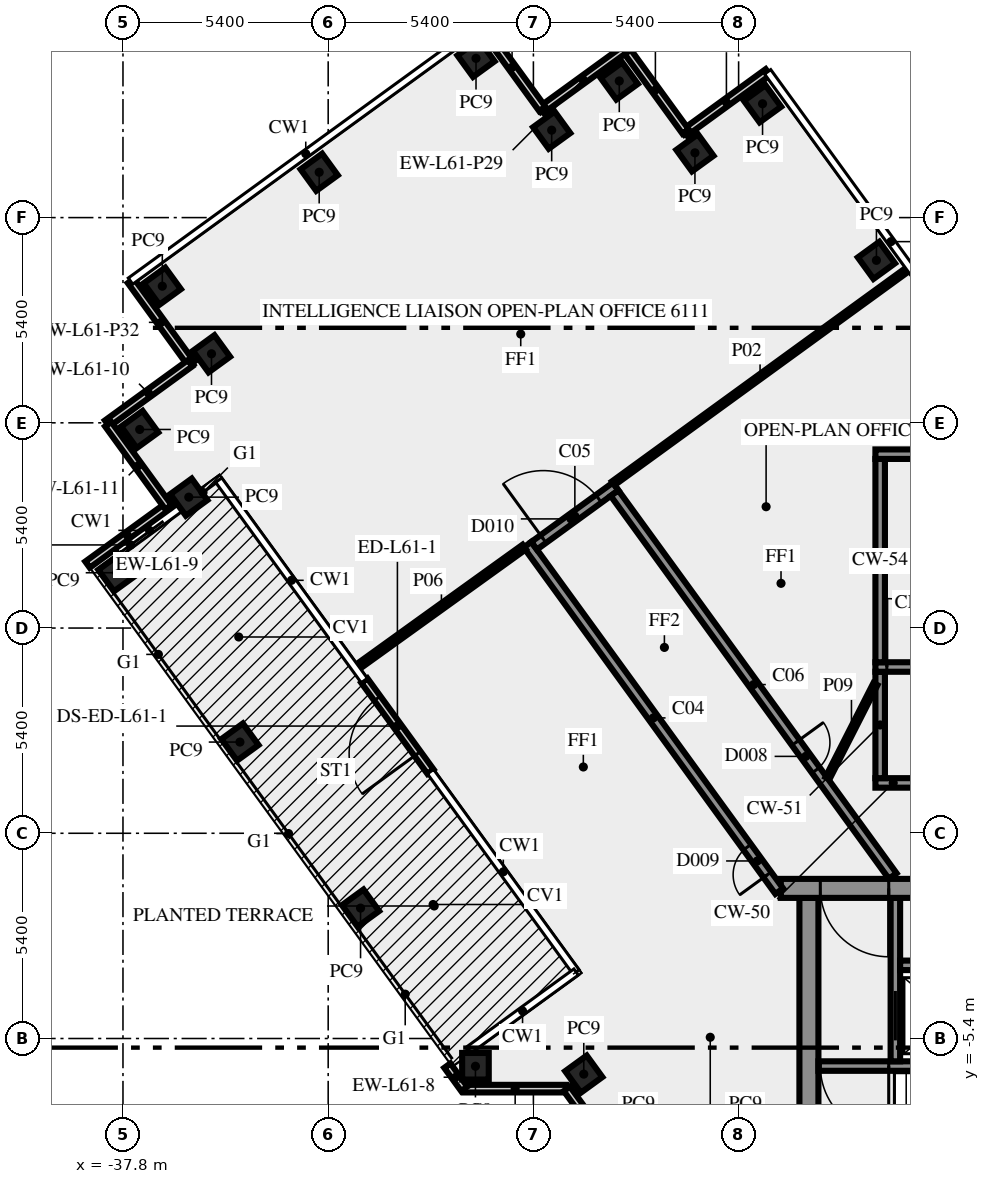
"""IFC4 building model, lengths in metres.
Left out: names, types, materials, properties, quantities, classifications, styles, units other than length and angle.
Written with IfcOpenShell. Run it as: python <this file> out.ifc"""

import sys

from ifc_helpers import new_model, si_unit, direction, frame, frame_2d, origin, origin_2d, place, context, subcontext, project, spatial, rectangle, extrude, element, fill, save


model = new_model("IFC4")
c1 = context("Model", 3, precision=1e-05, world=origin(), true_north=direction((0.0, 1.0)))
c2 = subcontext(c1, "Body", "Model", "MODEL_VIEW")
j1 = project(units=[si_unit("LENGTHUNIT", "METRE"), si_unit("PLANEANGLEUNIT", "RADIAN")], contexts=[c1])
p1 = place(None, origin())
s1 = spatial("IfcSite", under=j1, at=p1, CompositionType="ELEMENT")
p2 = place(p1, origin())
s2 = spatial("IfcBuilding", under=s1, at=p2, CompositionType="ELEMENT")
p3 = place(p2, frame((0.0, 0.0, 261.0)))
s3 = spatial("IfcBuildingStorey", under=s2, at=p3, CompositionType="ELEMENT", Elevation=261.0)
for number, where, z_axis, x_axis in (
    (1, (-17.974, 15.075, 0.0), (0.0, 0.0, 1.0), (-0.588, 0.809, 0.0)),
    (2, (-20.97, 19.195, 0.0), (0.0, 0.0, 1.0), (-0.588, 0.809, 0.0)),
    (3, (-22.749, 17.904, 0.0), (0.0, 0.0, 1.0), (-0.588, 0.809, 0.0)),
    (4, (-24.74, 19.795, 0.0), (0.0, 0.0, 1.0), (-0.588, 0.809, 0.0)),
    (5, (-26.519, 18.5, 0.0), (0.0, 0.0, 1.0), (-0.588, 0.809, 0.0)),
    (6, (-28.51, 20.39, 0.0), (0.0, 0.0, 1.0), (-0.809, -0.588, 0.0)),
    (7, (-32.637, 17.393, 0.0), (0.0, 0.0, 1.0), (-0.809, -0.588, 0.0)),
    (8, (-36.765, 14.395, 0.0), (0.0, 0.0, 1.0), (0.588, -0.809, 0.0)),
    (9, (-35.471, 12.616, 0.0), (0.0, 0.0, 1.0), (-0.809, -0.588, 0.0)),
    (10, (-37.36, 10.625, 0.0), (0.0, 0.0, 1.0), (0.588, -0.809, 0.0)),
    (11, (-36.068, 8.844, 0.0), (0.0, 0.0, 1.0), (0.588, -0.809, 0.0)),
    (12, (-37.96, 6.855, 0.0), (0.0, 0.0, 1.0), (0.588, -0.809, 0.0)),
    (13, (-34.722, 2.4, 0.0), (0.0, 0.0, 1.0), (0.588, -0.809, 0.0)),
    (14, (-31.548, -1.969, 0.0), (0.0, 0.0, 1.0), (0.588, -0.809, 0.0)),
    (15, (-28.525, -6.13, 0.0), (0.0, 0.0, 1.0), (1.0, 0.0, 0.0)),
    (16, (-25.674, -6.337, 0.0), (0.0, 0.0, 1.0), (0.588, -0.809, 0.0)),
):
    element("IfcColumn", number, at=place(p3, frame(where, z_axis=z_axis, x_axis=x_axis)), inside=s3, PredefinedType="COLUMN", context=c2, shape_type="SweptSolid", body=[
        extrude(rectangle(XDim=0.7, YDim=0.7, at=origin_2d()), origin(), (0.0, 0.0, 1.0), 3.65),
    ])
for number, where, z_axis, x_axis in (
    (17, (-20.829, 20.025, 0.0), (0.0, 0.0, 1.0), (-0.809, -0.588, 0.0)),
    (18, (-22.996, 18.466, 0.0), (0.0, 0.0, 1.0), (-0.588, 0.809, 0.0)),
):
    element("IfcWall", number, at=place(p3, frame(where, z_axis=z_axis, x_axis=x_axis)), inside=s3, PredefinedType="SOLIDWALL", context=c2, shape_type="SweptSolid", body=[
        extrude(rectangle(XDim=2.7, YDim=0.2, at=frame_2d((1.35, 0.0))), origin(), (0.0, 0.0, 1.0), 3.65),
    ])
for number, where, z_axis, x_axis in (
    (19, (-24.6, 20.623, 0.0), (0.0, 0.0, 1.0), (-0.809, -0.588, 0.0)),
    (20, (-26.768, 19.063, 0.0), (0.0, 0.0, 1.0), (-0.588, 0.809, 0.0)),
):
    element("IfcWall", number, at=place(p3, frame(where, z_axis=z_axis, x_axis=x_axis)), inside=s3, PredefinedType="SOLIDWALL", context=c2, shape_type="SweptSolid", body=[
        extrude(rectangle(XDim=2.7, YDim=0.2, at=frame_2d((1.35, 0.0))), origin(), (0.0, 0.0, 1.0), 3.65),
    ])
for number, where, z_axis, x_axis in (
    (21, (-37.592, 14.536, 0.0), (0.0, 0.0, 1.0), (0.588, -0.809, 0.0)),
    (22, (-28.83, -6.719, 0.0), (0.0, 0.0, 1.0), (1.0, 0.0, 0.0)),
):
    element("IfcWall", number, at=place(p3, frame(where, z_axis=z_axis, x_axis=x_axis)), inside=s3, PredefinedType="SOLIDWALL", context=c2, shape_type="SweptSolid", body=[
        extrude(rectangle(XDim=2.7, YDim=0.2, at=frame_2d((1.35, 0.0))), origin(), (0.0, 0.0, 1.0), 3.65),
    ])
p4 = place(p3, frame((-26.12, -6.724, 0.0), z_axis=(0.0, 0.0, 1.0), x_axis=(0.587720002413, -0.809064397168, 0.0)))
e23 = element("IfcWall", 23, at=p4, inside=s3, PredefinedType="SOLIDWALL", context=c2, shape_type="SweptSolid", body=[
    extrude(rectangle(XDim=2.7, YDim=0.2, at=frame_2d((1.35, 0.0))), origin(), (0.0, 0.0, 1.0), 3.65),
])
p5 = place(p3, frame((-29.708, 1.622, 0.0), z_axis=(0.0, 0.0, 1.0), x_axis=(-0.58782869016, 0.808985433135, 0.0)))
e24 = element("IfcWall", 24, at=p5, inside=s3, PredefinedType="SOLIDWALL", context=c2, shape_type="SweptSolid", body=[
    extrude(rectangle(XDim=2.963, YDim=0.2, at=frame_2d((1.481, 0.0))), origin(), (0.0, 0.0, 1.0), 3.65),
])
p6 = place(p5, frame((0.582, 0.0, 0.0)))
e25 = element("IfcOpeningElement", 25, at=p6, cuts=e24, PredefinedType="OPENING", context=c2, shape_type="SweptSolid", body=[
    extrude(rectangle(XDim=1.8, YDim=2.4, at=frame_2d((0.9, 1.2))), frame((0.0, 0.11, 0.0), z_axis=(0.0, -1.0, 0.0), x_axis=(1.0, 0.0, 0.0)), (0.0, 0.0, 1.0), 0.22),
])
p7 = place(p3, frame((-29.264, -6.113, 0.0), z_axis=(0.0, 0.0, 1.0), x_axis=(0.587941177097, -0.808903685412, 0.0)))
e26 = element("IfcWall", 26, at=p7, inside=s3, PredefinedType="SOLIDWALL", context=c2, shape_type="SweptSolid", body=[
    extrude(rectangle(XDim=0.756, YDim=0.2, at=frame_2d((0.378, 0.0))), origin(), (0.0, 0.0, 1.0), 3.65),
])
p8 = place(p3, frame((-36.629, 8.597, 0.0), z_axis=(0.0, 0.0, 1.0), x_axis=(-0.80901210161, -0.587791986546, 0.0)))
e27 = element("IfcWall", 27, at=p8, inside=s3, PredefinedType="SOLIDWALL", context=c2, shape_type="SweptSolid", body=[
    extrude(rectangle(XDim=2.6, YDim=0.2, at=frame_2d((1.3, 0.0))), origin(), (0.0, 0.0, 1.0), 3.65),
])
for number, where, z_axis, x_axis in (
    (28, (-36.032, 12.369, 0.0), (0.0, 0.0, 1.0), (-0.809, -0.588, 0.0)),
    (29, (-38.189, 10.765, 0.0), (0.0, 0.0, 1.0), (0.588, -0.809, 0.0)),
):
    element("IfcWall", number, at=place(p3, frame(where, z_axis=z_axis, x_axis=x_axis)), inside=s3, PredefinedType="SOLIDWALL", context=c2, shape_type="SweptSolid", body=[
        extrude(rectangle(XDim=2.7, YDim=0.2, at=frame_2d((1.35, 0.0))), origin(), (0.0, 0.0, 1.0), 3.65),
    ])
p9 = place(p3, frame((-19.75, -10.5, 0.0), z_axis=(0.0, 0.0, 1.0), x_axis=(0.0, 1.0, 0.0)))
e30 = element("IfcWall", 30, at=p9, inside=s3, PredefinedType="SHEAR", context=c2, shape_type="SweptSolid", body=[
    extrude(rectangle(XDim=8.8, YDim=0.5, at=frame_2d((4.4, 0.0))), origin(), (0.0, 0.0, 1.0), 3.65),
])
p10 = place(p3, frame((-11.45, -6.125, 0.0), z_axis=(0.0, 0.0, 1.0), x_axis=(-1.0, 0.0, 0.0)))
e31 = element("IfcWall", 31, at=p10, inside=s3, PredefinedType="SHEAR", context=c2, shape_type="SweptSolid", body=[
    extrude(rectangle(XDim=8.05, YDim=0.25, at=frame_2d((4.025, 0.0))), origin(), (0.0, 0.0, 1.0), 3.65),
])
p11 = place(p10, frame((6.2, 0.0, 0.0)))
e32 = element("IfcOpeningElement", 32, at=p11, cuts=e31, PredefinedType="OPENING", context=c2, shape_type="SweptSolid", body=[
    extrude(rectangle(XDim=1.8, YDim=2.1, at=frame_2d((0.9, 1.05))), frame((0.0, 0.135, 0.0), z_axis=(0.0, -1.0, 0.0), x_axis=(1.0, 0.0, 0.0)), (0.0, 0.0, 1.0), 0.27),
])
p12 = place(p3, frame((-17.475, -6.0, 0.0), z_axis=(0.0, 0.0, 1.0), x_axis=(0.0, 1.0, 0.0)))
e33 = element("IfcWall", 33, at=p12, inside=s3, PredefinedType="SHEAR", context=c2, shape_type="SweptSolid", body=[
    extrude(rectangle(XDim=4.3, YDim=0.25, at=frame_2d((2.15, 0.0))), origin(), (0.0, 0.0, 1.0), 3.65),
])
p13 = place(p12, frame((0.55, 0.0, 0.0)))
e34 = element("IfcOpeningElement", 34, at=p13, cuts=e33, PredefinedType="OPENING", context=c2, shape_type="SweptSolid", body=[
    extrude(rectangle(XDim=1.3, YDim=2.1, at=frame_2d((0.65, 1.05))), frame((0.0, 0.135, 0.0), z_axis=(0.0, -1.0, 0.0), x_axis=(1.0, 0.0, 0.0)), (0.0, 0.0, 1.0), 0.27),
])
p14 = place(p3, frame((-17.35, -3.475, 0.0), z_axis=(0.0, 0.0, 1.0), x_axis=(1.0, 0.0, 0.0)))
e35 = element("IfcWall", 35, at=p14, inside=s3, PredefinedType="SHEAR", context=c2, shape_type="SweptSolid", body=[
    extrude(rectangle(XDim=3.25, YDim=0.25, at=frame_2d((1.625, 0.0))), origin(), (0.0, 0.0, 1.0), 3.65),
])
p15 = place(p3, frame((20.49, -1.45, 0.0), z_axis=(0.0, 0.0, 1.0), x_axis=(-1.0, 0.0, 0.0)))
e36 = element("IfcWall", 36, at=p15, inside=s3, PredefinedType="SHEAR", context=c2, shape_type="SweptSolid", body=[
    extrude(rectangle(XDim=40.98, YDim=0.5, at=frame_2d((20.49, 0.0))), origin(), (0.0, 0.0, 1.0), 3.65),
])
p16 = place(p15, frame((38.14, 0.0, 0.0)))
e37 = element("IfcOpeningElement", 37, at=p16, cuts=e36, PredefinedType="OPENING", context=c2, shape_type="SweptSolid", body=[
    extrude(rectangle(XDim=1.8, YDim=2.1, at=frame_2d((0.9, 1.05))), frame((0.0, 0.26, 0.0), z_axis=(0.0, -1.0, 0.0), x_axis=(1.0, 0.0, 0.0)), (0.0, 0.0, 1.0), 0.52),
])
p17 = place(p15, frame((35.89, 0.0, 0.0)))
e38 = element("IfcOpeningElement", 38, at=p17, cuts=e36, PredefinedType="OPENING", context=c2, shape_type="SweptSolid", body=[
    extrude(rectangle(XDim=0.9, YDim=2.1, at=frame_2d((0.45, 1.05))), frame((0.0, 0.26, 0.0), z_axis=(0.0, -1.0, 0.0), x_axis=(1.0, 0.0, 0.0)), (0.0, 0.0, 1.0), 0.52),
])
p18 = place(p15, frame((32.94, 0.0, 0.0)))
e39 = element("IfcOpeningElement", 39, at=p18, cuts=e36, PredefinedType="OPENING", context=c2, shape_type="SweptSolid", body=[
    extrude(rectangle(XDim=0.9, YDim=2.1, at=frame_2d((0.45, 1.05))), frame((0.0, 0.26, 0.0), z_axis=(0.0, -1.0, 0.0), x_axis=(1.0, 0.0, 0.0)), (0.0, 0.0, 1.0), 0.52),
])
p19 = place(p15, frame((31.015, 0.0, 0.0)))
e40 = element("IfcOpeningElement", 40, at=p19, cuts=e36, PredefinedType="OPENING", context=c2, shape_type="SweptSolid", body=[
    extrude(rectangle(XDim=0.8, YDim=2.1, at=frame_2d((0.4, 1.05))), frame((0.0, 0.26, 0.0), z_axis=(0.0, -1.0, 0.0), x_axis=(1.0, 0.0, 0.0)), (0.0, 0.0, 1.0), 0.52),
])
p20 = place(p15, frame((24.765, 0.0, 0.0)))
e41 = element("IfcOpeningElement", 41, at=p20, cuts=e36, PredefinedType="OPENING", context=c2, shape_type="SweptSolid", body=[
    extrude(rectangle(XDim=0.8, YDim=2.1, at=frame_2d((0.4, 1.05))), frame((0.0, 0.26, 0.0), z_axis=(0.0, -1.0, 0.0), x_axis=(1.0, 0.0, 0.0)), (0.0, 0.0, 1.0), 0.52),
])
p21 = place(p15, frame((21.765, 0.0, 0.0)))
e42 = element("IfcOpeningElement", 42, at=p21, cuts=e36, PredefinedType="OPENING", context=c2, shape_type="SweptSolid", body=[
    extrude(rectangle(XDim=2.0, YDim=2.1, at=frame_2d((1.0, 1.05))), frame((0.0, 0.26, 0.0), z_axis=(0.0, -1.0, 0.0), x_axis=(1.0, 0.0, 0.0)), (0.0, 0.0, 1.0), 0.52),
])
p22 = place(p15, frame((14.202, 0.0, 0.0)))
e43 = element("IfcOpeningElement", 43, at=p22, cuts=e36, PredefinedType="OPENING", context=c2, shape_type="SweptSolid", body=[
    extrude(rectangle(XDim=0.9, YDim=2.1, at=frame_2d((0.45, 1.05))), frame((0.0, 0.26, 0.0), z_axis=(0.0, -1.0, 0.0), x_axis=(1.0, 0.0, 0.0)), (0.0, 0.0, 1.0), 0.52),
])
p23 = place(p15, frame((10.478, 0.0, 0.0)))
e44 = element("IfcOpeningElement", 44, at=p23, cuts=e36, PredefinedType="OPENING", context=c2, shape_type="SweptSolid", body=[
    extrude(rectangle(XDim=0.9, YDim=2.1, at=frame_2d((0.45, 1.05))), frame((0.0, 0.26, 0.0), z_axis=(0.0, -1.0, 0.0), x_axis=(1.0, 0.0, 0.0)), (0.0, 0.0, 1.0), 0.52),
])
p24 = place(p15, frame((7.14, 0.0, 0.0)))
e45 = element("IfcOpeningElement", 45, at=p24, cuts=e36, PredefinedType="OPENING", context=c2, shape_type="SweptSolid", body=[
    extrude(rectangle(XDim=0.9, YDim=2.1, at=frame_2d((0.45, 1.05))), frame((0.0, 0.26, 0.0), z_axis=(0.0, -1.0, 0.0), x_axis=(1.0, 0.0, 0.0)), (0.0, 0.0, 1.0), 0.52),
])
p25 = place(p15, frame((5.028, 0.0, 0.0)))
e46 = element("IfcOpeningElement", 46, at=p25, cuts=e36, PredefinedType="OPENING", context=c2, shape_type="SweptSolid", body=[
    extrude(rectangle(XDim=0.8, YDim=2.1, at=frame_2d((0.4, 1.05))), frame((0.0, 0.26, 0.0), z_axis=(0.0, -1.0, 0.0), x_axis=(1.0, 0.0, 0.0)), (0.0, 0.0, 1.0), 0.52),
])
p26 = place(p15, frame((3.452, 0.0, 0.0)))
e47 = element("IfcOpeningElement", 47, at=p26, cuts=e36, PredefinedType="OPENING", context=c2, shape_type="SweptSolid", body=[
    extrude(rectangle(XDim=0.8, YDim=2.1, at=frame_2d((0.4, 1.05))), frame((0.0, 0.26, 0.0), z_axis=(0.0, -1.0, 0.0), x_axis=(1.0, 0.0, 0.0)), (0.0, 0.0, 1.0), 0.52),
])
p27 = place(p15, frame((1.04, 0.0, 0.0)))
e48 = element("IfcOpeningElement", 48, at=p27, cuts=e36, PredefinedType="OPENING", context=c2, shape_type="SweptSolid", body=[
    extrude(rectangle(XDim=1.8, YDim=2.1, at=frame_2d((0.9, 1.05))), frame((0.0, 0.26, 0.0), z_axis=(0.0, -1.0, 0.0), x_axis=(1.0, 0.0, 0.0)), (0.0, 0.0, 1.0), 0.52),
])
p28 = place(p3, frame((-18.0, 1.325, 0.0), z_axis=(0.0, 0.0, 1.0), x_axis=(1.0, 0.0, 0.0)))
e49 = element("IfcWall", 49, at=p28, inside=s3, PredefinedType="SHEAR", context=c2, shape_type="SweptSolid", body=[
    extrude(rectangle(XDim=3.9, YDim=0.25, at=frame_2d((1.95, 0.0))), origin(), (0.0, 0.0, 1.0), 3.65),
])
p29 = place(p28, frame((1.1, 0.0, 0.0)))
e50 = element("IfcOpeningElement", 50, at=p29, cuts=e49, PredefinedType="OPENING", context=c2, shape_type="SweptSolid", body=[
    extrude(rectangle(XDim=1.8, YDim=2.1, at=frame_2d((0.9, 1.05))), frame((0.0, 0.135, 0.0), z_axis=(0.0, -1.0, 0.0), x_axis=(1.0, 0.0, 0.0)), (0.0, 0.0, 1.0), 0.27),
])
p30 = place(p3, frame((-17.875, 1.45, 0.0), z_axis=(0.0, 0.0, 1.0), x_axis=(0.0, 1.0, 0.0)))
e51 = element("IfcWall", 51, at=p30, inside=s3, PredefinedType="SHEAR", context=c2, shape_type="SweptSolid", body=[
    extrude(rectangle(XDim=2.8, YDim=0.25, at=frame_2d((1.4, 0.0))), origin(), (0.0, 0.0, 1.0), 3.65),
])
p31 = place(p3, frame((-18.0, 4.375, 0.0), z_axis=(0.0, 0.0, 1.0), x_axis=(1.0, 0.0, 0.0)))
e52 = element("IfcWall", 52, at=p31, inside=s3, PredefinedType="SHEAR", context=c2, shape_type="SweptSolid", body=[
    extrude(rectangle(XDim=10.5, YDim=0.25, at=frame_2d((5.25, 0.0))), origin(), (0.0, 0.0, 1.0), 3.65),
])
p32 = place(p31, frame((0.3, 0.0, 0.0)))
e53 = element("IfcOpeningElement", 53, at=p32, cuts=e52, PredefinedType="OPENING", context=c2, shape_type="SweptSolid", body=[
    extrude(rectangle(XDim=1.8, YDim=2.1, at=frame_2d((0.9, 1.05))), frame((0.0, 0.135, 0.0), z_axis=(0.0, -1.0, 0.0), x_axis=(1.0, 0.0, 0.0)), (0.0, 0.0, 1.0), 0.27),
])
p33 = place(p3, frame((-17.875, 4.5, 0.0), z_axis=(0.0, 0.0, 1.0), x_axis=(0.0, 1.0, 0.0)))
e54 = element("IfcWall", 54, at=p33, inside=s3, PredefinedType="SHEAR", context=c2, shape_type="SweptSolid", body=[
    extrude(rectangle(XDim=5.35, YDim=0.25, at=frame_2d((2.675, 0.0))), origin(), (0.0, 0.0, 1.0), 3.65),
])
p34 = place(p3, frame((-18.0, 9.975, 0.0), z_axis=(0.0, 0.0, 1.0), x_axis=(1.0, 0.0, 0.0)))
e55 = element("IfcWall", 55, at=p34, inside=s3, PredefinedType="SHEAR", context=c2, shape_type="SweptSolid", body=[
    extrude(rectangle(XDim=10.5, YDim=0.25, at=frame_2d((5.25, 0.0))), origin(), (0.0, 0.0, 1.0), 3.65),
])
p35 = place(p34, frame((4.5, 0.0, 1.0)))
e56 = element("IfcOpeningElement", 56, at=p35, cuts=e55, PredefinedType="OPENING", context=c2, shape_type="SweptSolid", body=[
    extrude(rectangle(XDim=1.2, YDim=1.2, at=frame_2d((0.6, 0.6))), frame((0.0, 0.135, 0.0), z_axis=(0.0, -1.0, 0.0), x_axis=(1.0, 0.0, 0.0)), (0.0, 0.0, 1.0), 0.27),
])
p36 = place(p3, frame((-20.531, -1.523, 0.0), z_axis=(0.0, 0.0, 1.0), x_axis=(-0.587782646447, 0.809018887626, 0.0)))
e57 = element("IfcWall", 57, at=p36, inside=s3, PredefinedType="SOLIDWALL", context=c2, shape_type="SweptSolid", body=[
    extrude(rectangle(XDim=11.27, YDim=0.25, at=frame_2d((5.635, 0.0))), origin(), (0.0, 0.0, 1.0), 3.65),
])
p37 = place(p36, frame((0.533, 0.0, 0.0)))
e58 = element("IfcOpeningElement", 58, at=p37, cuts=e57, PredefinedType="OPENING", context=c2, shape_type="SweptSolid", body=[
    extrude(rectangle(XDim=0.9, YDim=2.1, at=frame_2d((0.45, 1.05))), frame((0.0, 0.135, 0.0), z_axis=(0.0, -1.0, 0.0), x_axis=(1.0, 0.0, 0.0)), (0.0, 0.0, 1.0), 0.27),
])
p38 = place(p3, frame((-26.981, 7.567, 0.0), z_axis=(0.0, 0.0, 1.0), x_axis=(0.809038743598, 0.587755315891, 0.0)))
e59 = element("IfcWall", 59, at=p38, inside=s3, PredefinedType="SOLIDWALL", context=c2, shape_type="SweptSolid", body=[
    extrude(rectangle(XDim=2.65, YDim=0.25, at=frame_2d((1.325, 0.0))), origin(), (0.0, 0.0, 1.0), 3.65),
])
p39 = place(p38, frame((0.3, 0.0, 0.0)))
e60 = element("IfcOpeningElement", 60, at=p39, cuts=e59, PredefinedType="OPENING", context=c2, shape_type="SweptSolid", body=[
    extrude(rectangle(XDim=1.8, YDim=2.1, at=frame_2d((0.9, 1.05))), frame((0.0, 0.135, 0.0), z_axis=(0.0, -1.0, 0.0), x_axis=(1.0, 0.0, 0.0)), (0.0, 0.0, 1.0), 0.27),
])
p40 = place(p3, frame((-24.865, 8.95, 0.0), z_axis=(0.0, 0.0, 1.0), x_axis=(0.587791617212, -0.809012369952, 0.0)))
e61 = element("IfcWall", 61, at=p40, inside=s3, PredefinedType="SOLIDWALL", context=c2, shape_type="SweptSolid", body=[
    extrude(rectangle(XDim=12.453, YDim=0.25, at=frame_2d((6.227, 0.0))), origin(), (0.0, 0.0, 1.0), 3.65),
])
p41 = place(p40, frame((8.112, 0.0, 0.0)))
e62 = element("IfcOpeningElement", 62, at=p41, cuts=e61, PredefinedType="OPENING", context=c2, shape_type="SweptSolid", body=[
    extrude(rectangle(XDim=0.9, YDim=2.1, at=frame_2d((0.45, 1.05))), frame((0.0, 0.135, 0.0), z_axis=(0.0, -1.0, 0.0), x_axis=(1.0, 0.0, 0.0)), (0.0, 0.0, 1.0), 0.27),
])
p42 = place(p3, frame((-17.172, 14.823, 0.0), z_axis=(0.0, 0.0, 1.0), x_axis=(-0.809034479891, -0.587761184791, 0.0)))
e63 = element("IfcWall", 63, at=p42, inside=s3, PredefinedType="PARTITIONING", context=c2, shape_type="SweptSolid", body=[
    extrude(rectangle(XDim=9.55, YDim=0.12, at=frame_2d((4.775, 0.0))), origin(), (0.0, 0.0, 1.0), 2.95),
])
p43 = place(p3, frame((-31.6, 4.397, 0.0), z_axis=(0.0, 0.0, 1.0), x_axis=(0.811784350662, 0.583957334075, 0.0)))
e64 = element("IfcWall", 64, at=p43, inside=s3, PredefinedType="PARTITIONING", context=c2, shape_type="SweptSolid", body=[
    extrude(rectangle(XDim=5.37, YDim=0.15, at=frame_2d((2.685, 0.0))), origin(), (0.0, 0.0, 1.0), 3.65),
])
p44 = place(p3, frame((-19.261, 1.45, 0.0), z_axis=(0.0, 0.0, 1.0), x_axis=(0.453950796792, 0.891026752736, 0.0)))
e65 = element("IfcWall", 65, at=p44, inside=s3, PredefinedType="PARTITIONING", context=c2, shape_type="SweptSolid", body=[
    extrude(rectangle(XDim=2.778, YDim=0.12, at=frame_2d((1.389, 0.0))), origin(), (0.0, 0.0, 1.0), 3.65),
])
p45 = place(p6, origin())
e66 = element("IfcDoor", 66, at=p45, inside=s3, OperationType="DOUBLE_DOOR_SINGLE_SWING", PredefinedType="DOOR", context=c2, shape_type="SweptSolid", body=[
    extrude(rectangle(XDim=1.8, YDim=2.4, at=frame_2d((0.9, 1.2))), frame((0.0, 0.025, 0.0), z_axis=(0.0, -1.0, 0.0), x_axis=(1.0, 0.0, 0.0)), (0.0, 0.0, 1.0), 0.05),
])
fill(e25, e66)
p46 = place(p11, origin())
e67 = element("IfcDoor", 67, at=p46, inside=s3, OperationType="DOUBLE_DOOR_SINGLE_SWING", PredefinedType="DOOR", context=c2, shape_type="SweptSolid", body=[
    extrude(rectangle(XDim=1.8, YDim=2.1, at=frame_2d((0.9, 1.05))), frame((0.0, 0.025, 0.0), z_axis=(0.0, -1.0, 0.0), x_axis=(1.0, 0.0, 0.0)), (0.0, 0.0, 1.0), 0.05),
])
fill(e32, e67)
p47 = place(p13, origin())
e68 = element("IfcDoor", 68, at=p47, inside=s3, OperationType="DOUBLE_DOOR_SLIDING", PredefinedType="DOOR", context=c2, shape_type="SweptSolid", body=[
    extrude(rectangle(XDim=1.3, YDim=2.1, at=frame_2d((0.65, 1.05))), frame((0.0, 0.025, 0.0), z_axis=(0.0, -1.0, 0.0), x_axis=(1.0, 0.0, 0.0)), (0.0, 0.0, 1.0), 0.05),
])
fill(e34, e68)
p48 = place(p16, origin())
e69 = element("IfcDoor", 69, at=p48, inside=s3, OperationType="DOUBLE_DOOR_SINGLE_SWING", PredefinedType="DOOR", context=c2, shape_type="SweptSolid", body=[
    extrude(rectangle(XDim=1.8, YDim=2.1, at=frame_2d((0.9, 1.05))), frame((0.0, 0.025, 0.0), z_axis=(0.0, -1.0, 0.0), x_axis=(1.0, 0.0, 0.0)), (0.0, 0.0, 1.0), 0.05),
])
fill(e37, e69)
p49 = place(p32, origin())
e70 = element("IfcDoor", 70, at=p49, inside=s3, OperationType="DOUBLE_DOOR_SINGLE_SWING", PredefinedType="DOOR", context=c2, shape_type="SweptSolid", body=[
    extrude(rectangle(XDim=1.8, YDim=2.1, at=frame_2d((0.9, 1.05))), frame((0.0, 0.025, 0.0), z_axis=(0.0, -1.0, 0.0), x_axis=(1.0, 0.0, 0.0)), (0.0, 0.0, 1.0), 0.05),
])
fill(e53, e70)
p50 = place(p41, origin())
e71 = element("IfcDoor", 71, at=p50, inside=s3, OperationType="SINGLE_SWING_RIGHT", PredefinedType="DOOR", context=c2, shape_type="SweptSolid", body=[
    extrude(rectangle(XDim=0.9, YDim=2.1, at=frame_2d((0.45, 1.05))), frame((0.0, 0.025, 0.0), z_axis=(0.0, -1.0, 0.0), x_axis=(1.0, 0.0, 0.0)), (0.0, 0.0, 1.0), 0.05),
])
fill(e62, e71)
p51 = place(p39, origin())
e72 = element("IfcDoor", 72, at=p51, inside=s3, OperationType="DOUBLE_DOOR_SINGLE_SWING", PredefinedType="DOOR", context=c2, shape_type="SweptSolid", body=[
    extrude(rectangle(XDim=1.8, YDim=2.1, at=frame_2d((0.9, 1.05))), frame((0.0, 0.025, 0.0), z_axis=(0.0, -1.0, 0.0), x_axis=(1.0, 0.0, 0.0)), (0.0, 0.0, 1.0), 0.05),
])
fill(e60, e72)
p52 = place(p37, origin())
e73 = element("IfcDoor", 73, at=p52, inside=s3, OperationType="SINGLE_SWING_LEFT", PredefinedType="DOOR", context=c2, shape_type="SweptSolid", body=[
    extrude(rectangle(XDim=0.9, YDim=2.1, at=frame_2d((0.45, 1.05))), frame((0.0, 0.025, 0.0), z_axis=(0.0, -1.0, 0.0), x_axis=(1.0, 0.0, 0.0)), (0.0, 0.0, 1.0), 0.05),
])
fill(e58, e73)
save(model, sys.argv[1])
